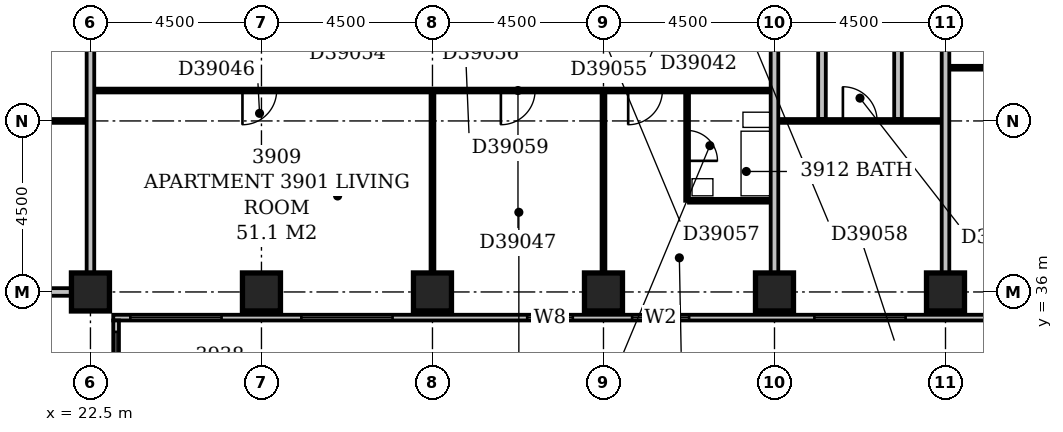
"""IFC4 building model, lengths in metres.
Left out: names, types, materials, properties, quantities, classifications, styles, units other than length and angle.
Written with IfcOpenShell. Run it as: python <this file> out.ifc"""

import sys

from ifc_helpers import new_model, si_unit, direction, frame, frame_2d, origin, origin_2d, place, context, subcontext, project, spatial, rectangle, extrude, element, fill, save


model = new_model("IFC4")
c1 = context("Model", 3, precision=1e-05, world=origin(), true_north=direction((0.0, 1.0)))
c2 = subcontext(c1, "Body", "Model", "MODEL_VIEW")
j1 = project(units=[si_unit("LENGTHUNIT", "METRE"), si_unit("PLANEANGLEUNIT", "RADIAN")], contexts=[c1])
p1 = place(None, origin())
s1 = spatial("IfcSite", under=j1, at=p1, CompositionType="ELEMENT")
p2 = place(p1, origin())
s2 = spatial("IfcBuilding", under=s1, at=p2, CompositionType="ELEMENT")
p3 = place(p2, frame((0.0, 0.0, 155.6)))
s3 = spatial("IfcBuildingStorey", under=s2, at=p3, CompositionType="ELEMENT", Elevation=155.6)
for number, where, z_axis, x_axis in (
    (1, (22.5, 36.0, -0.3), (0.0, 0.0, 1.0), (1.0, 0.0, 0.0)),
    (2, (27.0, 36.0, -0.3), (0.0, 0.0, 1.0), (1.0, 0.0, 0.0)),
    (3, (31.5, 36.0, -0.3), (0.0, 0.0, 1.0), (1.0, 0.0, 0.0)),
    (4, (36.0, 36.0, -0.3), (0.0, 0.0, 1.0), (1.0, 0.0, 0.0)),
    (5, (40.5, 36.0, -0.3), (0.0, 0.0, 1.0), (1.0, 0.0, 0.0)),
    (6, (45.0, 36.0, -0.3), (0.0, 0.0, 1.0), (1.0, 0.0, 0.0)),
):
    element("IfcColumn", number, at=place(p3, frame(where, z_axis=z_axis, x_axis=x_axis)), inside=s3, PredefinedType="COLUMN", context=c2, shape_type="SweptSolid", body=[
        extrude(rectangle(XDim=1.0, YDim=1.0, at=origin_2d()), origin(), (0.0, 0.0, 1.0), 3.6),
    ])
p4 = place(p3, frame((23.175, 17.4, 0.0), z_axis=(0.0, 0.0, 1.0), x_axis=(0.0, 1.0, 0.0)))
e7 = element("IfcWall", 7, at=p4, inside=s3, PredefinedType="STANDARD", context=c2, shape_type="SweptSolid", body=[
    extrude(rectangle(XDim=17.85, YDim=0.15, at=frame_2d((8.925, 0.0))), origin(), (0.0, 0.0, 1.0), 2.7),
])
p5 = place(p4, frame((1.65, 0.0, 0.6)))
e8 = element("IfcOpeningElement", 8, at=p5, cuts=e7, PredefinedType="OPENING", context=c2, shape_type="SweptSolid", body=[
    extrude(rectangle(XDim=2.4, YDim=1.8, at=frame_2d((1.2, 0.9))), frame((0.0, 0.087, 0.0), z_axis=(0.0, -1.0, 0.0), x_axis=(1.0, 0.0, 0.0)), (0.0, 0.0, 1.0), 0.174),
])
p6 = place(p4, frame((6.15, 0.0, 0.6)))
e9 = element("IfcOpeningElement", 9, at=p6, cuts=e7, PredefinedType="OPENING", context=c2, shape_type="SweptSolid", body=[
    extrude(rectangle(XDim=2.4, YDim=1.8, at=frame_2d((1.2, 0.9))), frame((0.0, 0.087, 0.0), z_axis=(0.0, -1.0, 0.0), x_axis=(1.0, 0.0, 0.0)), (0.0, 0.0, 1.0), 0.174),
])
p7 = place(p4, frame((10.329, 0.0, 0.6)))
e10 = element("IfcOpeningElement", 10, at=p7, cuts=e7, PredefinedType="OPENING", context=c2, shape_type="SweptSolid", body=[
    extrude(rectangle(XDim=2.1, YDim=1.8, at=frame_2d((1.05, 0.9))), frame((0.0, 0.087, 0.0), z_axis=(0.0, -1.0, 0.0), x_axis=(1.0, 0.0, 0.0)), (0.0, 0.0, 1.0), 0.174),
])
p8 = place(p4, frame((15.15, 0.0, 0.6)))
e11 = element("IfcOpeningElement", 11, at=p8, cuts=e7, PredefinedType="OPENING", context=c2, shape_type="SweptSolid", body=[
    extrude(rectangle(XDim=2.4, YDim=1.8, at=frame_2d((1.2, 0.9))), frame((0.0, 0.087, 0.0), z_axis=(0.0, -1.0, 0.0), x_axis=(1.0, 0.0, 0.0)), (0.0, 0.0, 1.0), 0.174),
])
p9 = place(p3, frame((23.1, 35.325, 0.0), z_axis=(0.0, 0.0, 1.0), x_axis=(1.0, 0.0, 0.0)))
e12 = element("IfcWall", 12, at=p9, inside=s3, PredefinedType="STANDARD", context=c2, shape_type="SweptSolid", body=[
    extrude(rectangle(XDim=45.15, YDim=0.15, at=frame_2d((22.575, 0.0))), origin(), (0.0, 0.0, 1.0), 2.7),
])
p10 = place(p9, frame((0.45, 0.0, 0.6)))
e13 = element("IfcOpeningElement", 13, at=p10, cuts=e12, PredefinedType="OPENING", context=c2, shape_type="SweptSolid", body=[
    extrude(rectangle(XDim=2.4, YDim=1.8, at=frame_2d((1.2, 0.9))), frame((0.0, 0.087, 0.0), z_axis=(0.0, -1.0, 0.0), x_axis=(1.0, 0.0, 0.0)), (0.0, 0.0, 1.0), 0.174),
])
p11 = place(p9, frame((4.95, 0.0, 0.6)))
e14 = element("IfcOpeningElement", 14, at=p11, cuts=e12, PredefinedType="OPENING", context=c2, shape_type="SweptSolid", body=[
    extrude(rectangle(XDim=2.4, YDim=1.8, at=frame_2d((1.2, 0.9))), frame((0.0, 0.087, 0.0), z_axis=(0.0, -1.0, 0.0), x_axis=(1.0, 0.0, 0.0)), (0.0, 0.0, 1.0), 0.174),
])
p12 = place(p9, frame((10.893, 0.0, 0.6)))
e15 = element("IfcOpeningElement", 15, at=p12, cuts=e12, PredefinedType="OPENING", context=c2, shape_type="SweptSolid", body=[
    extrude(rectangle(XDim=1.2, YDim=1.8, at=frame_2d((0.6, 0.9))), frame((0.0, 0.087, 0.0), z_axis=(0.0, -1.0, 0.0), x_axis=(1.0, 0.0, 0.0)), (0.0, 0.0, 1.0), 0.174),
])
p13 = place(p9, frame((13.653, 0.0, 0.6)))
e16 = element("IfcOpeningElement", 16, at=p13, cuts=e12, PredefinedType="OPENING", context=c2, shape_type="SweptSolid", body=[
    extrude(rectangle(XDim=1.5, YDim=1.8, at=frame_2d((0.75, 0.9))), frame((0.0, 0.087, 0.0), z_axis=(0.0, -1.0, 0.0), x_axis=(1.0, 0.0, 0.0)), (0.0, 0.0, 1.0), 0.174),
])
p14 = place(p9, frame((18.45, 0.0, 0.6)))
e17 = element("IfcOpeningElement", 17, at=p14, cuts=e12, PredefinedType="OPENING", context=c2, shape_type="SweptSolid", body=[
    extrude(rectangle(XDim=2.4, YDim=1.8, at=frame_2d((1.2, 0.9))), frame((0.0, 0.087, 0.0), z_axis=(0.0, -1.0, 0.0), x_axis=(1.0, 0.0, 0.0)), (0.0, 0.0, 1.0), 0.174),
])
p15 = place(p9, frame((22.95, 0.0, 0.6)))
e18 = element("IfcOpeningElement", 18, at=p15, cuts=e12, PredefinedType="OPENING", context=c2, shape_type="SweptSolid", body=[
    extrude(rectangle(XDim=2.4, YDim=1.8, at=frame_2d((1.2, 0.9))), frame((0.0, 0.087, 0.0), z_axis=(0.0, -1.0, 0.0), x_axis=(1.0, 0.0, 0.0)), (0.0, 0.0, 1.0), 0.174),
])
p16 = place(p9, frame((27.45, 0.0, 0.6)))
e19 = element("IfcOpeningElement", 19, at=p16, cuts=e12, PredefinedType="OPENING", context=c2, shape_type="SweptSolid", body=[
    extrude(rectangle(XDim=2.4, YDim=1.8, at=frame_2d((1.2, 0.9))), frame((0.0, 0.087, 0.0), z_axis=(0.0, -1.0, 0.0), x_axis=(1.0, 0.0, 0.0)), (0.0, 0.0, 1.0), 0.174),
])
p17 = place(p9, frame((31.95, 0.0, 0.6)))
e20 = element("IfcOpeningElement", 20, at=p17, cuts=e12, PredefinedType="OPENING", context=c2, shape_type="SweptSolid", body=[
    extrude(rectangle(XDim=2.4, YDim=1.8, at=frame_2d((1.2, 0.9))), frame((0.0, 0.087, 0.0), z_axis=(0.0, -1.0, 0.0), x_axis=(1.0, 0.0, 0.0)), (0.0, 0.0, 1.0), 0.174),
])
p18 = place(p9, frame((36.45, 0.0, 0.6)))
e21 = element("IfcOpeningElement", 21, at=p18, cuts=e12, PredefinedType="OPENING", context=c2, shape_type="SweptSolid", body=[
    extrude(rectangle(XDim=2.4, YDim=1.8, at=frame_2d((1.2, 0.9))), frame((0.0, 0.087, 0.0), z_axis=(0.0, -1.0, 0.0), x_axis=(1.0, 0.0, 0.0)), (0.0, 0.0, 1.0), 0.174),
])
p19 = place(p9, frame((41.27, 0.0, 0.6)))
e22 = element("IfcOpeningElement", 22, at=p19, cuts=e12, PredefinedType="OPENING", context=c2, shape_type="SweptSolid", body=[
    extrude(rectangle(XDim=2.4, YDim=1.8, at=frame_2d((1.2, 0.9))), frame((0.0, 0.087, 0.0), z_axis=(0.0, -1.0, 0.0), x_axis=(1.0, 0.0, 0.0)), (0.0, 0.0, 1.0), 0.174),
])
for number, where, z_axis, x_axis in (
    (23, (9.1, 36.0, 0.0), (0.0, 0.0, 1.0), (1.0, 0.0, 0.0)),
    (24, (22.5, 36.5, 0.0), (0.0, 0.0, 1.0), (0.0, 1.0, 0.0)),
):
    element("IfcWall", number, at=place(p3, frame(where, z_axis=z_axis, x_axis=x_axis)), inside=s3, PredefinedType="PARTITIONING", context=c2, shape_type="SweptSolid", body=[
        extrude(rectangle(XDim=12.9, YDim=0.2, at=frame_2d((6.45, 0.0))), origin(), (0.0, 0.0, 1.0), 3.3),
    ])
p20 = place(p3, frame((31.5, 36.5, 0.0), z_axis=(0.0, 0.0, 1.0), x_axis=(0.0, 1.0, 0.0)))
e25 = element("IfcWall", 25, at=p20, inside=s3, PredefinedType="PARTITIONING", context=c2, shape_type="SweptSolid", body=[
    extrude(rectangle(XDim=4.75, YDim=0.1, at=frame_2d((2.375, 0.0))), origin(), (0.0, 0.0, 1.0), 3.3),
])
p21 = place(p3, frame((36.0, 36.5, 0.0), z_axis=(0.0, 0.0, 1.0), x_axis=(0.0, 1.0, 0.0)))
e26 = element("IfcWall", 26, at=p21, inside=s3, PredefinedType="PARTITIONING", context=c2, shape_type="SweptSolid", body=[
    extrude(rectangle(XDim=4.75, YDim=0.1, at=frame_2d((2.375, 0.0))), origin(), (0.0, 0.0, 1.0), 2.4),
])
p22 = place(p3, frame((40.5, 36.5, 0.0), z_axis=(0.0, 0.0, 1.0), x_axis=(0.0, 1.0, 0.0)))
e27 = element("IfcWall", 27, at=p22, inside=s3, PredefinedType="PARTITIONING", context=c2, shape_type="SweptSolid", body=[
    extrude(rectangle(XDim=12.9, YDim=0.2, at=frame_2d((6.45, 0.0))), origin(), (0.0, 0.0, 1.0), 3.3),
])
p23 = place(p3, frame((45.0, 36.5, 0.0), z_axis=(0.0, 0.0, 1.0), x_axis=(0.0, 1.0, 0.0)))
e28 = element("IfcWall", 28, at=p23, inside=s3, PredefinedType="PARTITIONING", context=c2, shape_type="SweptSolid", body=[
    extrude(rectangle(XDim=12.9, YDim=0.2, at=frame_2d((6.45, 0.0))), origin(), (0.0, 0.0, 1.0), 2.6),
])
p24 = place(p3, frame((38.2, 38.4, 0.0), z_axis=(0.0, 0.0, 1.0), x_axis=(0.0, 1.0, 0.0)))
e29 = element("IfcWall", 29, at=p24, inside=s3, PredefinedType="PLUMBINGWALL", context=c2, shape_type="SweptSolid", body=[
    extrude(rectangle(XDim=2.85, YDim=0.1, at=frame_2d((1.425, 0.0))), origin(), (0.0, 0.0, 1.0), 3.3),
])
p25 = place(p24, frame((1.05, 0.0, 0.0)))
e30 = element("IfcOpeningElement", 30, at=p25, cuts=e29, PredefinedType="OPENING", context=c2, shape_type="SweptSolid", body=[
    extrude(rectangle(XDim=0.8, YDim=2.1, at=frame_2d((0.4, 1.05))), frame((0.0, 0.062, 0.0), z_axis=(0.0, -1.0, 0.0), x_axis=(1.0, 0.0, 0.0)), (0.0, 0.0, 1.0), 0.124),
])
p26 = place(p3, frame((38.25, 38.4, 0.0), z_axis=(0.0, 0.0, 1.0), x_axis=(1.0, 0.0, 0.0)))
e31 = element("IfcWall", 31, at=p26, inside=s3, PredefinedType="PLUMBINGWALL", context=c2, shape_type="SweptSolid", body=[
    extrude(rectangle(XDim=2.15, YDim=0.1, at=frame_2d((1.075, 0.0))), origin(), (0.0, 0.0, 1.0), 3.3),
])
p27 = place(p3, frame((9.1, 40.5, 0.0), z_axis=(0.0, 0.0, 1.0), x_axis=(1.0, 0.0, 0.0)))
e32 = element("IfcWall", 32, at=p27, inside=s3, PredefinedType="PARTITIONING", context=c2, shape_type="SweptSolid", body=[
    extrude(rectangle(XDim=13.3, YDim=0.1, at=frame_2d((6.65, 0.0))), origin(), (0.0, 0.0, 1.0), 3.3),
])
p28 = place(p3, frame((40.6, 40.5, 0.0), z_axis=(0.0, 0.0, 1.0), x_axis=(1.0, 0.0, 0.0)))
e33 = element("IfcWall", 33, at=p28, inside=s3, PredefinedType="PARTITIONING", context=c2, shape_type="SweptSolid", body=[
    extrude(rectangle(XDim=4.3, YDim=0.1, at=frame_2d((2.15, 0.0))), origin(), (0.0, 0.0, 1.0), 3.3),
])
p29 = place(p28, frame((1.7, 0.0, 0.0)))
e34 = element("IfcOpeningElement", 34, at=p29, cuts=e33, PredefinedType="OPENING", context=c2, shape_type="SweptSolid", body=[
    extrude(rectangle(XDim=0.9, YDim=2.1, at=frame_2d((0.45, 1.05))), frame((0.0, 0.062, 0.0), z_axis=(0.0, -1.0, 0.0), x_axis=(1.0, 0.0, 0.0)), (0.0, 0.0, 1.0), 0.124),
])
p30 = place(p3, frame((41.75, 40.55, 0.0), z_axis=(0.0, 0.0, 1.0), x_axis=(0.0, 1.0, 0.0)))
e35 = element("IfcWall", 35, at=p30, inside=s3, PredefinedType="PARTITIONING", context=c2, shape_type="SweptSolid", body=[
    extrude(rectangle(XDim=8.95, YDim=0.2, at=frame_2d((4.475, 0.0))), origin(), (0.0, 0.0, 1.0), 3.3),
])
p31 = place(p30, frame((5.55, 0.0, 0.0)))
e36 = element("IfcOpeningElement", 36, at=p31, cuts=e35, PredefinedType="OPENING", context=c2, shape_type="SweptSolid", body=[
    extrude(rectangle(XDim=0.8, YDim=2.1, at=frame_2d((0.4, 1.05))), frame((0.0, 0.112, 0.0), z_axis=(0.0, -1.0, 0.0), x_axis=(1.0, 0.0, 0.0)), (0.0, 0.0, 1.0), 0.224),
])
p32 = place(p3, frame((43.75, 40.55, 0.0), z_axis=(0.0, 0.0, 1.0), x_axis=(0.0, 1.0, 0.0)))
e37 = element("IfcWall", 37, at=p32, inside=s3, PredefinedType="PARTITIONING", context=c2, shape_type="SweptSolid", body=[
    extrude(rectangle(XDim=8.95, YDim=0.2, at=frame_2d((4.475, 0.0))), origin(), (0.0, 0.0, 1.0), 3.3),
])
p33 = place(p32, frame((5.55, 0.0, 0.0)))
e38 = element("IfcOpeningElement", 38, at=p33, cuts=e37, PredefinedType="OPENING", context=c2, shape_type="SweptSolid", body=[
    extrude(rectangle(XDim=0.8, YDim=2.1, at=frame_2d((0.4, 1.05))), frame((0.0, 0.112, 0.0), z_axis=(0.0, -1.0, 0.0), x_axis=(1.0, 0.0, 0.0)), (0.0, 0.0, 1.0), 0.224),
])
p34 = place(p3, frame((22.6, 41.3, 0.0), z_axis=(0.0, 0.0, 1.0), x_axis=(1.0, 0.0, 0.0)))
e39 = element("IfcWall", 39, at=p34, inside=s3, PredefinedType="PARTITIONING", context=c2, shape_type="SweptSolid", body=[
    extrude(rectangle(XDim=17.8, YDim=0.1, at=frame_2d((8.9, 0.0))), origin(), (0.0, 0.0, 1.0), 3.3),
])
p35 = place(p34, frame((3.9, 0.0, 0.0)))
e40 = element("IfcOpeningElement", 40, at=p35, cuts=e39, PredefinedType="OPENING", context=c2, shape_type="SweptSolid", body=[
    extrude(rectangle(XDim=0.9, YDim=2.1, at=frame_2d((0.45, 1.05))), frame((0.0, 0.062, 0.0), z_axis=(0.0, -1.0, 0.0), x_axis=(1.0, 0.0, 0.0)), (0.0, 0.0, 1.0), 0.124),
])
p36 = place(p34, frame((10.7, 0.0, 0.0)))
e41 = element("IfcOpeningElement", 41, at=p36, cuts=e39, PredefinedType="OPENING", context=c2, shape_type="SweptSolid", body=[
    extrude(rectangle(XDim=0.9, YDim=2.1, at=frame_2d((0.45, 1.05))), frame((0.0, 0.062, 0.0), z_axis=(0.0, -1.0, 0.0), x_axis=(1.0, 0.0, 0.0)), (0.0, 0.0, 1.0), 0.124),
])
p37 = place(p34, frame((14.05, 0.0, 0.0)))
e42 = element("IfcOpeningElement", 42, at=p37, cuts=e39, PredefinedType="OPENING", context=c2, shape_type="SweptSolid", body=[
    extrude(rectangle(XDim=0.9, YDim=2.1, at=frame_2d((0.45, 1.05))), frame((0.0, 0.062, 0.0), z_axis=(0.0, -1.0, 0.0), x_axis=(1.0, 0.0, 0.0)), (0.0, 0.0, 1.0), 0.124),
])
p38 = place(p3, frame((45.1, 41.9, 0.0), z_axis=(0.0, 0.0, 1.0), x_axis=(1.0, 0.0, 0.0)))
e43 = element("IfcWall", 43, at=p38, inside=s3, PredefinedType="PARTITIONING", context=c2, shape_type="SweptSolid", body=[
    extrude(rectangle(XDim=13.3, YDim=0.1, at=frame_2d((6.65, 0.0))), origin(), (0.0, 0.0, 1.0), 3.3),
])
p39 = place(p38, frame((1.7, 0.0, 0.0)))
e44 = element("IfcOpeningElement", 44, at=p39, cuts=e43, PredefinedType="OPENING", context=c2, shape_type="SweptSolid", body=[
    extrude(rectangle(XDim=0.9, YDim=2.1, at=frame_2d((0.45, 1.05))), frame((0.0, 0.062, 0.0), z_axis=(0.0, -1.0, 0.0), x_axis=(1.0, 0.0, 0.0)), (0.0, 0.0, 1.0), 0.124),
])
p40 = place(p38, frame((6.2, 0.0, 0.0)))
e45 = element("IfcOpeningElement", 45, at=p40, cuts=e43, PredefinedType="OPENING", context=c2, shape_type="SweptSolid", body=[
    extrude(rectangle(XDim=0.9, YDim=2.1, at=frame_2d((0.45, 1.05))), frame((0.0, 0.062, 0.0), z_axis=(0.0, -1.0, 0.0), x_axis=(1.0, 0.0, 0.0)), (0.0, 0.0, 1.0), 0.124),
])
p41 = place(p38, frame((10.7, 0.0, 0.0)))
e46 = element("IfcOpeningElement", 46, at=p41, cuts=e43, PredefinedType="OPENING", context=c2, shape_type="SweptSolid", body=[
    extrude(rectangle(XDim=0.9, YDim=2.1, at=frame_2d((0.45, 1.05))), frame((0.0, 0.062, 0.0), z_axis=(0.0, -1.0, 0.0), x_axis=(1.0, 0.0, 0.0)), (0.0, 0.0, 1.0), 0.124),
])
p42 = place(p8, origin())
e47 = element("IfcWindow", 47, at=p42, inside=s3, PartitioningType="SINGLE_PANEL", PredefinedType="WINDOW", context=c2, shape_type="SweptSolid", body=[
    extrude(rectangle(XDim=2.4, YDim=1.8, at=frame_2d((1.2, 0.9))), frame((0.0, 0.03, 0.0), z_axis=(0.0, -1.0, 0.0), x_axis=(1.0, 0.0, 0.0)), (0.0, 0.0, 1.0), 0.06),
])
fill(e11, e47)
p43 = place(p10, origin())
e48 = element("IfcWindow", 48, at=p43, inside=s3, PartitioningType="SINGLE_PANEL", PredefinedType="WINDOW", context=c2, shape_type="SweptSolid", body=[
    extrude(rectangle(XDim=2.4, YDim=1.8, at=frame_2d((1.2, 0.9))), frame((0.0, 0.03, 0.0), z_axis=(0.0, -1.0, 0.0), x_axis=(1.0, 0.0, 0.0)), (0.0, 0.0, 1.0), 0.06),
])
fill(e13, e48)
p44 = place(p11, origin())
e49 = element("IfcWindow", 49, at=p44, inside=s3, PartitioningType="SINGLE_PANEL", PredefinedType="WINDOW", context=c2, shape_type="SweptSolid", body=[
    extrude(rectangle(XDim=2.4, YDim=1.8, at=frame_2d((1.2, 0.9))), frame((0.0, 0.03, 0.0), z_axis=(0.0, -1.0, 0.0), x_axis=(1.0, 0.0, 0.0)), (0.0, 0.0, 1.0), 0.06),
])
fill(e14, e49)
p45 = place(p12, origin())
e50 = element("IfcWindow", 50, at=p45, inside=s3, PartitioningType="SINGLE_PANEL", PredefinedType="WINDOW", context=c2, shape_type="SweptSolid", body=[
    extrude(rectangle(XDim=1.2, YDim=1.8, at=frame_2d((0.6, 0.9))), frame((0.0, 0.03, 0.0), z_axis=(0.0, -1.0, 0.0), x_axis=(1.0, 0.0, 0.0)), (0.0, 0.0, 1.0), 0.06),
])
fill(e15, e50)
p46 = place(p13, origin())
e51 = element("IfcWindow", 51, at=p46, inside=s3, PartitioningType="SINGLE_PANEL", PredefinedType="WINDOW", context=c2, shape_type="SweptSolid", body=[
    extrude(rectangle(XDim=1.5, YDim=1.8, at=frame_2d((0.75, 0.9))), frame((0.0, 0.03, 0.0), z_axis=(0.0, -1.0, 0.0), x_axis=(1.0, 0.0, 0.0)), (0.0, 0.0, 1.0), 0.06),
])
fill(e16, e51)
p47 = place(p14, origin())
e52 = element("IfcWindow", 52, at=p47, inside=s3, PartitioningType="SINGLE_PANEL", PredefinedType="WINDOW", context=c2, shape_type="SweptSolid", body=[
    extrude(rectangle(XDim=2.4, YDim=1.8, at=frame_2d((1.2, 0.9))), frame((0.0, 0.03, 0.0), z_axis=(0.0, -1.0, 0.0), x_axis=(1.0, 0.0, 0.0)), (0.0, 0.0, 1.0), 0.06),
])
fill(e17, e52)
p48 = place(p25, frame((0.8, 0.0, 0.0), z_axis=(0.0, 0.0, 1.0), x_axis=(-1.0, 0.0, 0.0)))
e53 = element("IfcDoor", 53, at=p48, inside=s3, OperationType="SINGLE_SWING_RIGHT", PredefinedType="DOOR", context=c2, shape_type="SweptSolid", body=[
    extrude(rectangle(XDim=0.8, YDim=2.1, at=frame_2d((0.4, 1.05))), frame((0.0, 0.025, 0.0), z_axis=(0.0, -1.0, 0.0), x_axis=(1.0, 0.0, 0.0)), (0.0, 0.0, 1.0), 0.05),
])
fill(e30, e53)
p49 = place(p29, origin())
e54 = element("IfcDoor", 54, at=p49, inside=s3, OperationType="SINGLE_SWING_LEFT", PredefinedType="DOOR", context=c2, shape_type="SweptSolid", body=[
    extrude(rectangle(XDim=0.9, YDim=2.1, at=frame_2d((0.45, 1.05))), frame((0.0, 0.025, 0.0), z_axis=(0.0, -1.0, 0.0), x_axis=(1.0, 0.0, 0.0)), (0.0, 0.0, 1.0), 0.05),
])
fill(e34, e54)
p50 = place(p35, frame((0.9, 0.0, 0.0), z_axis=(0.0, 0.0, 1.0), x_axis=(-1.0, 0.0, 0.0)))
e55 = element("IfcDoor", 55, at=p50, inside=s3, OperationType="SINGLE_SWING_RIGHT", PredefinedType="DOOR", context=c2, shape_type="SweptSolid", body=[
    extrude(rectangle(XDim=0.9, YDim=2.1, at=frame_2d((0.45, 1.05))), frame((0.0, 0.025, 0.0), z_axis=(0.0, -1.0, 0.0), x_axis=(1.0, 0.0, 0.0)), (0.0, 0.0, 1.0), 0.05),
])
fill(e40, e55)
p51 = place(p36, frame((0.9, 0.0, 0.0), z_axis=(0.0, 0.0, 1.0), x_axis=(-1.0, 0.0, 0.0)))
e56 = element("IfcDoor", 56, at=p51, inside=s3, OperationType="SINGLE_SWING_RIGHT", PredefinedType="DOOR", context=c2, shape_type="SweptSolid", body=[
    extrude(rectangle(XDim=0.9, YDim=2.1, at=frame_2d((0.45, 1.05))), frame((0.0, 0.025, 0.0), z_axis=(0.0, -1.0, 0.0), x_axis=(1.0, 0.0, 0.0)), (0.0, 0.0, 1.0), 0.05),
])
fill(e41, e56)
p52 = place(p37, frame((0.9, 0.0, 0.0), z_axis=(0.0, 0.0, 1.0), x_axis=(-1.0, 0.0, 0.0)))
e57 = element("IfcDoor", 57, at=p52, inside=s3, OperationType="SINGLE_SWING_RIGHT", PredefinedType="DOOR", context=c2, shape_type="SweptSolid", body=[
    extrude(rectangle(XDim=0.9, YDim=2.1, at=frame_2d((0.45, 1.05))), frame((0.0, 0.025, 0.0), z_axis=(0.0, -1.0, 0.0), x_axis=(1.0, 0.0, 0.0)), (0.0, 0.0, 1.0), 0.05),
])
fill(e42, e57)
save(model, sys.argv[1])
